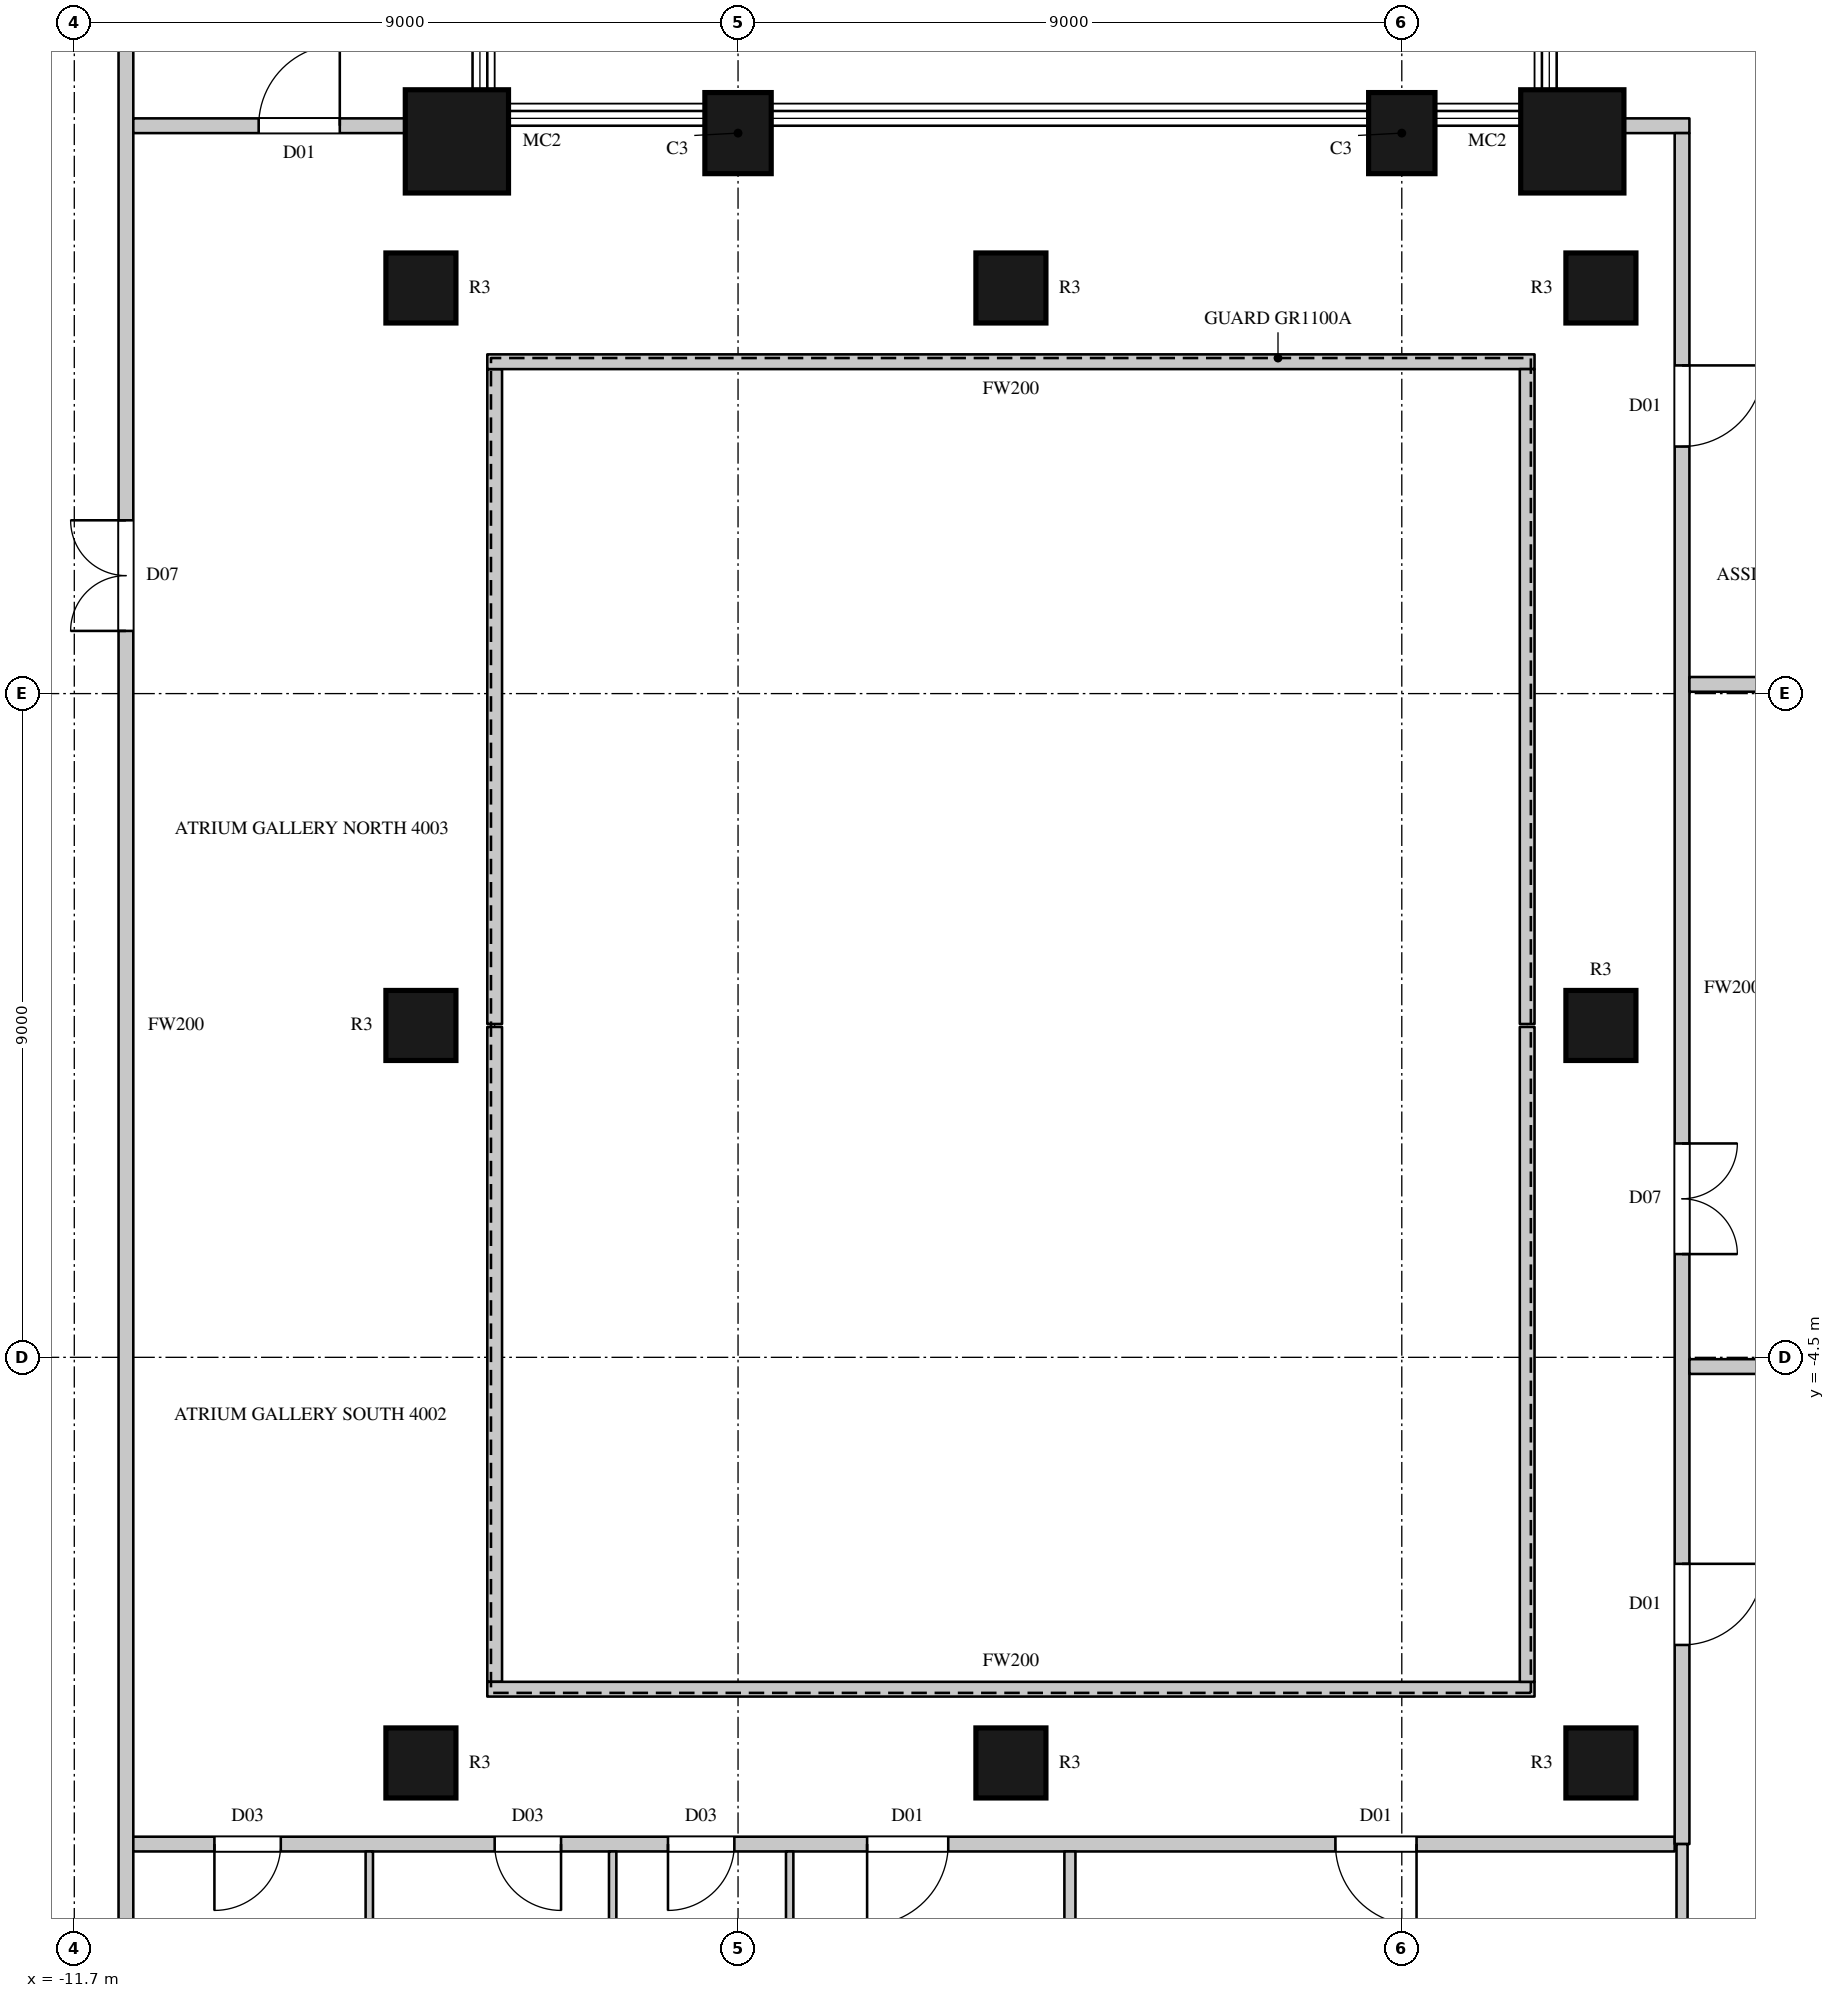
"""IFC4 building model, lengths in metres.
Left out: names, types, materials, properties, quantities, classifications, styles, units other than length and angle.
Written with IfcOpenShell. Run it as: python <this file> out.ifc"""

import sys

from ifc_helpers import new_model, si_unit, direction, frame, frame_2d, origin, origin_2d, place, context, subcontext, project, spatial, rectangle, circle, extrude, element, fill, save


model = new_model("IFC4")
c1 = context("Model", 3, precision=1e-05, world=origin(), true_north=direction((0.0, 1.0)))
c2 = subcontext(c1, "Body", "Model", "MODEL_VIEW")
j1 = project(units=[si_unit("LENGTHUNIT", "METRE"), si_unit("PLANEANGLEUNIT", "RADIAN")], contexts=[c1])
p1 = place(None, origin())
s1 = spatial("IfcSite", under=j1, at=p1, CompositionType="ELEMENT")
p2 = place(p1, origin())
s2 = spatial("IfcBuilding", under=s1, at=p2, CompositionType="ELEMENT")
p3 = place(p2, frame((0.0, 0.0, 185.1)))
s3 = spatial("IfcBuildingStorey", under=s2, at=p3, CompositionType="ELEMENT", Elevation=185.1)
p4 = place(p3, frame((8.612, 11.988, 0.0), z_axis=(0.0, 0.0, 1.0), x_axis=(1.0, 0.0, 0.0)))
e1 = element("IfcColumn", 1, at=p4, inside=s3, PredefinedType="COLUMN", context=c2, shape_type="SweptSolid", body=[
    extrude(circle(Radius=0.7, at=origin_2d()), origin(), (0.0, 0.0, 1.0), 4.1),
])
for number, where, z_axis, x_axis in (
    (2, (6.3, 12.1, 0.0), (0.0, 0.0, 1.0), (-1.0, 0.0, 0.0)),
    (3, (-2.7, 12.1, 0.0), (0.0, 0.0, 1.0), (-1.0, 0.0, 0.0)),
):
    element("IfcColumn", number, at=place(p3, frame(where, z_axis=z_axis, x_axis=x_axis)), inside=s3, PredefinedType="COLUMN", context=c2, shape_type="SweptSolid", body=[
        extrude(rectangle(XDim=0.9, YDim=1.1, at=origin_2d()), origin(), (0.0, 0.0, 1.0), 4.1),
    ])
p5 = place(p3, frame((-6.512, 11.988, 0.0), z_axis=(0.0, 0.0, 1.0), x_axis=(1.0, 0.0, 0.0)))
e4 = element("IfcColumn", 4, at=p5, inside=s3, PredefinedType="COLUMN", context=c2, shape_type="SweptSolid", body=[
    extrude(circle(Radius=0.7, at=origin_2d()), origin(), (0.0, 0.0, 1.0), 4.1),
])
for number, where, z_axis, x_axis in (
    (5, (-7.0, -10.0, 0.0), (0.0, 0.0, 1.0), (1.0, 0.0, 0.0)),
    (6, (-7.0, 0.0, 0.0), (0.0, 0.0, 1.0), (1.0, 0.0, 0.0)),
    (7, (-7.0, 10.0, 0.0), (0.0, 0.0, 1.0), (1.0, 0.0, 0.0)),
    (8, (1.0, -10.0, 0.0), (0.0, 0.0, 1.0), (1.0, 0.0, 0.0)),
    (9, (1.0, 10.0, 0.0), (0.0, 0.0, 1.0), (1.0, 0.0, 0.0)),
    (10, (9.0, -10.0, 0.0), (0.0, 0.0, 1.0), (1.0, 0.0, 0.0)),
    (11, (9.0, 0.0, 0.0), (0.0, 0.0, 1.0), (1.0, 0.0, 0.0)),
    (12, (9.0, 10.0, 0.0), (0.0, 0.0, 1.0), (1.0, 0.0, 0.0)),
):
    element("IfcColumn", number, at=place(p3, frame(where, z_axis=z_axis, x_axis=x_axis)), inside=s3, PredefinedType="COLUMN", context=c2, shape_type="SweptSolid", body=[
        extrude(circle(Radius=0.475, at=origin_2d()), origin(), (0.0, 0.0, 1.0), 4.1),
    ])
p6 = place(p3, frame((13.941, 11.053, 0.0), z_axis=(0.0, 0.0, 1.0), x_axis=(-0.707106781187, 0.707106781187, 0.0)))
e13 = element("IfcWall", 13, at=p6, inside=s3, PredefinedType="SOLIDWALL", context=c2, shape_type="SweptSolid", body=[
    extrude(rectangle(XDim=6.505, YDim=0.45, at=frame_2d((3.252, 0.0))), origin(), (0.0, 0.0, 1.0), 3.8),
])
p7 = place(p6, frame((0.665, 0.0, 0.0)))
e14 = element("IfcOpeningElement", 14, at=p7, cuts=e13, PredefinedType="OPENING", context=c2, shape_type="SweptSolid", body=[
    extrude(rectangle(XDim=1.8, YDim=2.4, at=frame_2d((0.9, 1.2))), frame((0.0, 0.235, 0.0), z_axis=(0.0, -1.0, 0.0), x_axis=(1.0, 0.0, 0.0)), (0.0, 0.0, 1.0), 0.47),
])
p8 = place(p3, frame((-11.0, -14.8, 0.0), z_axis=(0.0, 0.0, 1.0), x_axis=(0.0, 1.0, 0.0)))
e15 = element("IfcWall", 15, at=p8, inside=s3, PredefinedType="PARTITIONING", context=c2, shape_type="SweptSolid", body=[
    extrude(rectangle(XDim=29.6, YDim=0.2, at=frame_2d((14.8, 0.0))), origin(), (0.0, 0.0, 1.0), 3.8),
])
p9 = place(p8, frame((20.15, 0.0, 0.0)))
e16 = element("IfcOpeningElement", 16, at=p9, cuts=e15, PredefinedType="OPENING", context=c2, shape_type="SweptSolid", body=[
    extrude(rectangle(XDim=1.5, YDim=2.4, at=frame_2d((0.75, 1.2))), frame((0.0, 0.11, 0.0), z_axis=(0.0, -1.0, 0.0), x_axis=(1.0, 0.0, 0.0)), (0.0, 0.0, 1.0), 0.22),
])
p10 = place(p3, frame((-10.9, -11.1, 0.0), z_axis=(0.0, 0.0, 1.0), x_axis=(1.0, 0.0, 0.0)))
e17 = element("IfcWall", 17, at=p10, inside=s3, PredefinedType="PARTITIONING", context=c2, shape_type="SweptSolid", body=[
    extrude(rectangle(XDim=20.9, YDim=0.2, at=frame_2d((10.45, 0.0))), origin(), (0.0, 0.0, 1.0), 3.8),
])
p11 = place(p10, frame((1.1, 0.0, 0.0)))
e18 = element("IfcOpeningElement", 18, at=p11, cuts=e17, PredefinedType="OPENING", context=c2, shape_type="SweptSolid", body=[
    extrude(rectangle(XDim=0.9, YDim=2.2, at=frame_2d((0.45, 1.1))), frame((0.0, 0.11, 0.0), z_axis=(0.0, -1.0, 0.0), x_axis=(1.0, 0.0, 0.0)), (0.0, 0.0, 1.0), 0.22),
])
p12 = place(p10, frame((4.9, 0.0, 0.0)))
e19 = element("IfcOpeningElement", 19, at=p12, cuts=e17, PredefinedType="OPENING", context=c2, shape_type="SweptSolid", body=[
    extrude(rectangle(XDim=0.9, YDim=2.2, at=frame_2d((0.45, 1.1))), frame((0.0, 0.11, 0.0), z_axis=(0.0, -1.0, 0.0), x_axis=(1.0, 0.0, 0.0)), (0.0, 0.0, 1.0), 0.22),
])
p13 = place(p10, frame((7.25, 0.0, 0.0)))
e20 = element("IfcOpeningElement", 20, at=p13, cuts=e17, PredefinedType="OPENING", context=c2, shape_type="SweptSolid", body=[
    extrude(rectangle(XDim=0.9, YDim=2.2, at=frame_2d((0.45, 1.1))), frame((0.0, 0.11, 0.0), z_axis=(0.0, -1.0, 0.0), x_axis=(1.0, 0.0, 0.0)), (0.0, 0.0, 1.0), 0.22),
])
p14 = place(p10, frame((9.95, 0.0, 0.0)))
e21 = element("IfcOpeningElement", 21, at=p14, cuts=e17, PredefinedType="OPENING", context=c2, shape_type="SweptSolid", body=[
    extrude(rectangle(XDim=1.1, YDim=2.4, at=frame_2d((0.55, 1.2))), frame((0.0, 0.11, 0.0), z_axis=(0.0, -1.0, 0.0), x_axis=(1.0, 0.0, 0.0)), (0.0, 0.0, 1.0), 0.22),
])
p15 = place(p10, frame((16.3, 0.0, 0.0)))
e22 = element("IfcOpeningElement", 22, at=p15, cuts=e17, PredefinedType="OPENING", context=c2, shape_type="SweptSolid", body=[
    extrude(rectangle(XDim=1.1, YDim=2.4, at=frame_2d((0.55, 1.2))), frame((0.0, 0.11, 0.0), z_axis=(0.0, -1.0, 0.0), x_axis=(1.0, 0.0, 0.0)), (0.0, 0.0, 1.0), 0.22),
])
p16 = place(p3, frame((-10.9, 12.2, 0.0), z_axis=(0.0, 0.0, 1.0), x_axis=(1.0, 0.0, 0.0)))
e23 = element("IfcWall", 23, at=p16, inside=s3, PredefinedType="PARTITIONING", context=c2, shape_type="SweptSolid", body=[
    extrude(rectangle(XDim=3.704, YDim=0.2, at=frame_2d((1.852, 0.0))), origin(), (0.0, 0.0, 1.0), 3.8),
])
p17 = place(p16, frame((1.7, 0.0, 0.0)))
e24 = element("IfcOpeningElement", 24, at=p17, cuts=e23, PredefinedType="OPENING", context=c2, shape_type="SweptSolid", body=[
    extrude(rectangle(XDim=1.1, YDim=2.4, at=frame_2d((0.55, 1.2))), frame((0.0, 0.11, 0.0), z_axis=(0.0, -1.0, 0.0), x_axis=(1.0, 0.0, 0.0)), (0.0, 0.0, 1.0), 0.22),
])
p18 = place(p3, frame((-6.0, -8.9, 0.0), z_axis=(0.0, 0.0, 1.0), x_axis=(0.0, 1.0, 0.0)))
e25 = element("IfcWall", 25, at=p18, inside=s3, PredefinedType="PARTITIONING", context=c2, shape_type="SweptSolid", body=[
    extrude(rectangle(XDim=8.88, YDim=0.2, at=frame_2d((4.44, 0.0))), origin(), (0.0, 0.0, 1.0), 3.8),
])
p19 = place(p3, frame((-6.1, -9.0, 0.0), z_axis=(0.0, 0.0, 1.0), x_axis=(1.0, 0.0, 0.0)))
e26 = element("IfcWall", 26, at=p19, inside=s3, PredefinedType="PARTITIONING", context=c2, shape_type="SweptSolid", body=[
    extrude(rectangle(XDim=14.2, YDim=0.2, at=frame_2d((7.1, 0.0))), origin(), (0.0, 0.0, 1.0), 3.8),
])
p20 = place(p3, frame((-6.0, 0.02, 0.0), z_axis=(0.0, 0.0, 1.0), x_axis=(0.0, 1.0, 0.0)))
e27 = element("IfcWall", 27, at=p20, inside=s3, PredefinedType="PARTITIONING", context=c2, shape_type="SweptSolid", body=[
    extrude(rectangle(XDim=8.88, YDim=0.2, at=frame_2d((4.44, 0.0))), origin(), (0.0, 0.0, 1.0), 3.8),
])
p21 = place(p3, frame((-6.1, 9.0, 0.0), z_axis=(0.0, 0.0, 1.0), x_axis=(1.0, 0.0, 0.0)))
e28 = element("IfcWall", 28, at=p21, inside=s3, PredefinedType="PARTITIONING", context=c2, shape_type="SweptSolid", body=[
    extrude(rectangle(XDim=14.2, YDim=0.2, at=frame_2d((7.1, 0.0))), origin(), (0.0, 0.0, 1.0), 3.8),
])
for number, where, z_axis, x_axis in (
    (29, (8.0, -8.9, 0.0), (0.0, 0.0, 1.0), (0.0, 1.0, 0.0)),
    (30, (8.0, 0.02, 0.0), (0.0, 0.0, 1.0), (0.0, 1.0, 0.0)),
):
    element("IfcWall", number, at=place(p3, frame(where, z_axis=z_axis, x_axis=x_axis)), inside=s3, PredefinedType="PARTITIONING", context=c2, shape_type="SweptSolid", body=[
        extrude(rectangle(XDim=8.88, YDim=0.2, at=frame_2d((4.44, 0.0))), origin(), (0.0, 0.0, 1.0), 3.8),
    ])
p22 = place(p3, frame((9.296, 12.2, 0.0), z_axis=(0.0, 0.0, 1.0), x_axis=(1.0, 0.0, 0.0)))
e31 = element("IfcWall", 31, at=p22, inside=s3, PredefinedType="PARTITIONING", context=c2, shape_type="SweptSolid", body=[
    extrude(rectangle(XDim=0.904, YDim=0.2, at=frame_2d((0.452, 0.0))), origin(), (0.0, 0.0, 1.0), 3.8),
])
p23 = place(p3, frame((10.1, -11.1, 0.0), z_axis=(0.0, 0.0, 1.0), x_axis=(0.0, 1.0, 0.0)))
e32 = element("IfcWall", 32, at=p23, inside=s3, PredefinedType="PARTITIONING", context=c2, shape_type="SweptSolid", body=[
    extrude(rectangle(XDim=23.2, YDim=0.2, at=frame_2d((11.6, 0.0))), origin(), (0.0, 0.0, 1.0), 3.8),
])
p24 = place(p23, frame((8.0, 0.0, 0.0)))
e33 = element("IfcOpeningElement", 33, at=p24, cuts=e32, PredefinedType="OPENING", context=c2, shape_type="SweptSolid", body=[
    extrude(rectangle(XDim=1.5, YDim=2.4, at=frame_2d((0.75, 1.2))), frame((0.0, 0.11, 0.0), z_axis=(0.0, -1.0, 0.0), x_axis=(1.0, 0.0, 0.0)), (0.0, 0.0, 1.0), 0.22),
])
p25 = place(p23, frame((18.95, 0.0, 0.0)))
e34 = element("IfcOpeningElement", 34, at=p25, cuts=e32, PredefinedType="OPENING", context=c2, shape_type="SweptSolid", body=[
    extrude(rectangle(XDim=1.1, YDim=2.4, at=frame_2d((0.55, 1.2))), frame((0.0, 0.11, 0.0), z_axis=(0.0, -1.0, 0.0), x_axis=(1.0, 0.0, 0.0)), (0.0, 0.0, 1.0), 0.22),
])
p26 = place(p23, frame((2.7, 0.0, 0.0)))
e35 = element("IfcOpeningElement", 35, at=p26, cuts=e32, PredefinedType="OPENING", context=c2, shape_type="SweptSolid", body=[
    extrude(rectangle(XDim=1.1, YDim=2.4, at=frame_2d((0.55, 1.2))), frame((0.0, 0.11, 0.0), z_axis=(0.0, -1.0, 0.0), x_axis=(1.0, 0.0, 0.0)), (0.0, 0.0, 1.0), 0.22),
])
for number, where, z_axis, x_axis in (
    (36, (10.2, -4.625, 0.0), (0.0, 0.0, 1.0), (1.0, 0.0, 0.0)),
    (37, (10.2, 4.625, 0.0), (0.0, 0.0, 1.0), (1.0, 0.0, 0.0)),
):
    element("IfcWall", number, at=place(p3, frame(where, z_axis=z_axis, x_axis=x_axis)), inside=s3, PredefinedType="PARTITIONING", context=c2, shape_type="SweptSolid", body=[
        extrude(rectangle(XDim=4.475, YDim=0.2, at=frame_2d((2.238, 0.0))), origin(), (0.0, 0.0, 1.0), 3.8),
    ])
p27 = place(p3, frame((1.8, -16.7, 0.0), z_axis=(0.0, 0.0, 1.0), x_axis=(0.0, 1.0, 0.0)))
e38 = element("IfcWall", 38, at=p27, inside=s3, PredefinedType="PARTITIONING", context=c2, shape_type="SweptSolid", body=[
    extrude(rectangle(XDim=5.5, YDim=0.15, at=frame_2d((2.75, 0.0))), origin(), (0.0, 0.0, 1.0), 3.15),
])
p28 = place(p3, frame((10.1, -16.7, 0.0), z_axis=(0.0, 0.0, 1.0), x_axis=(0.0, 1.0, 0.0)))
e39 = element("IfcWall", 39, at=p28, inside=s3, PredefinedType="PARTITIONING", context=c2, shape_type="SweptSolid", body=[
    extrude(rectangle(XDim=5.6, YDim=0.15, at=frame_2d((2.8, 0.0))), origin(), (0.0, 0.0, 1.0), 3.8),
])
for number, where, z_axis, x_axis in (
    (40, (-7.7, -16.7, 0.0), (0.0, 0.0, 1.0), (0.0, 1.0, 0.0)),
    (41, (-4.4, -16.7, 0.0), (0.0, 0.0, 1.0), (0.0, 1.0, 0.0)),
    (42, (-2.0, -16.7, 0.0), (0.0, 0.0, 1.0), (0.0, 1.0, 0.0)),
):
    element("IfcWall", number, at=place(p3, frame(where, z_axis=z_axis, x_axis=x_axis)), inside=s3, PredefinedType="PARTITIONING", context=c2, shape_type="SweptSolid", body=[
        extrude(rectangle(XDim=5.5, YDim=0.1, at=frame_2d((2.75, 0.0))), origin(), (0.0, 0.0, 1.0), 3.8),
    ])
p29 = place(p9, origin())
e43 = element("IfcDoor", 43, at=p29, inside=s3, OperationType="DOUBLE_DOOR_SINGLE_SWING", PredefinedType="DOOR", context=c2, shape_type="SweptSolid", body=[
    extrude(rectangle(XDim=1.5, YDim=2.4, at=frame_2d((0.75, 1.2))), frame((0.0, 0.025, 0.0), z_axis=(0.0, -1.0, 0.0), x_axis=(1.0, 0.0, 0.0)), (0.0, 0.0, 1.0), 0.05),
])
fill(e16, e43)
p30 = place(p24, origin())
e44 = element("IfcDoor", 44, at=p30, inside=s3, OperationType="DOUBLE_DOOR_SINGLE_SWING", PredefinedType="DOOR", context=c2, shape_type="SweptSolid", body=[
    extrude(rectangle(XDim=1.5, YDim=2.4, at=frame_2d((0.75, 1.2))), frame((0.0, 0.025, 0.0), z_axis=(0.0, -1.0, 0.0), x_axis=(1.0, 0.0, 0.0)), (0.0, 0.0, 1.0), 0.05),
])
fill(e33, e44)
p31 = place(p11, origin())
e45 = element("IfcDoor", 45, at=p31, inside=s3, OperationType="SINGLE_SWING_RIGHT", PredefinedType="DOOR", context=c2, shape_type="SweptSolid", body=[
    extrude(rectangle(XDim=0.9, YDim=2.2, at=frame_2d((0.45, 1.1))), frame((0.0, 0.025, 0.0), z_axis=(0.0, -1.0, 0.0), x_axis=(1.0, 0.0, 0.0)), (0.0, 0.0, 1.0), 0.05),
])
fill(e18, e45)
p32 = place(p12, origin())
e46 = element("IfcDoor", 46, at=p32, inside=s3, OperationType="SINGLE_SWING_LEFT", PredefinedType="DOOR", context=c2, shape_type="SweptSolid", body=[
    extrude(rectangle(XDim=0.9, YDim=2.2, at=frame_2d((0.45, 1.1))), frame((0.0, 0.025, 0.0), z_axis=(0.0, -1.0, 0.0), x_axis=(1.0, 0.0, 0.0)), (0.0, 0.0, 1.0), 0.05),
])
fill(e19, e46)
p33 = place(p13, origin())
e47 = element("IfcDoor", 47, at=p33, inside=s3, OperationType="SINGLE_SWING_RIGHT", PredefinedType="DOOR", context=c2, shape_type="SweptSolid", body=[
    extrude(rectangle(XDim=0.9, YDim=2.2, at=frame_2d((0.45, 1.1))), frame((0.0, 0.025, 0.0), z_axis=(0.0, -1.0, 0.0), x_axis=(1.0, 0.0, 0.0)), (0.0, 0.0, 1.0), 0.05),
])
fill(e20, e47)
p34 = place(p17, origin())
e48 = element("IfcDoor", 48, at=p34, inside=s3, OperationType="SINGLE_SWING_RIGHT", PredefinedType="DOOR", context=c2, shape_type="SweptSolid", body=[
    extrude(rectangle(XDim=1.1, YDim=2.4, at=frame_2d((0.55, 1.2))), frame((0.0, 0.025, 0.0), z_axis=(0.0, -1.0, 0.0), x_axis=(1.0, 0.0, 0.0)), (0.0, 0.0, 1.0), 0.05),
])
fill(e24, e48)
p35 = place(p14, origin())
e49 = element("IfcDoor", 49, at=p35, inside=s3, OperationType="SINGLE_SWING_RIGHT", PredefinedType="DOOR", context=c2, shape_type="SweptSolid", body=[
    extrude(rectangle(XDim=1.1, YDim=2.4, at=frame_2d((0.55, 1.2))), frame((0.0, 0.025, 0.0), z_axis=(0.0, -1.0, 0.0), x_axis=(1.0, 0.0, 0.0)), (0.0, 0.0, 1.0), 0.05),
])
fill(e21, e49)
p36 = place(p15, origin())
e50 = element("IfcDoor", 50, at=p36, inside=s3, OperationType="SINGLE_SWING_LEFT", PredefinedType="DOOR", context=c2, shape_type="SweptSolid", body=[
    extrude(rectangle(XDim=1.1, YDim=2.4, at=frame_2d((0.55, 1.2))), frame((0.0, 0.025, 0.0), z_axis=(0.0, -1.0, 0.0), x_axis=(1.0, 0.0, 0.0)), (0.0, 0.0, 1.0), 0.05),
])
fill(e22, e50)
p37 = place(p25, origin())
e51 = element("IfcDoor", 51, at=p37, inside=s3, OperationType="SINGLE_SWING_LEFT", PredefinedType="DOOR", context=c2, shape_type="SweptSolid", body=[
    extrude(rectangle(XDim=1.1, YDim=2.4, at=frame_2d((0.55, 1.2))), frame((0.0, 0.025, 0.0), z_axis=(0.0, -1.0, 0.0), x_axis=(1.0, 0.0, 0.0)), (0.0, 0.0, 1.0), 0.05),
])
fill(e34, e51)
p38 = place(p26, origin())
e52 = element("IfcDoor", 52, at=p38, inside=s3, OperationType="SINGLE_SWING_LEFT", PredefinedType="DOOR", context=c2, shape_type="SweptSolid", body=[
    extrude(rectangle(XDim=1.1, YDim=2.4, at=frame_2d((0.55, 1.2))), frame((0.0, 0.025, 0.0), z_axis=(0.0, -1.0, 0.0), x_axis=(1.0, 0.0, 0.0)), (0.0, 0.0, 1.0), 0.05),
])
fill(e35, e52)
save(model, sys.argv[1])
